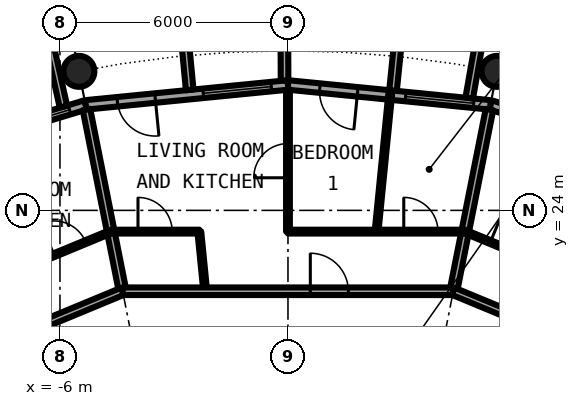
"""IFC4 building model, lengths in metres.
Left out: names, types, materials, properties, quantities, classifications, styles, units other than length and angle.
Written with IfcOpenShell. Run it as: python <this file> out.ifc"""

import sys

from ifc_helpers import new_model, si_unit, direction, frame, frame_2d, origin, origin_2d, place, context, subcontext, project, spatial, rectangle, hollow_circle, extrude, element, fill, save


model = new_model("IFC4")
c1 = context("Model", 3, precision=1e-05, world=origin(), true_north=direction((0.0, 1.0)))
c2 = subcontext(c1, "Body", "Model", "MODEL_VIEW")
j1 = project(units=[si_unit("LENGTHUNIT", "METRE"), si_unit("PLANEANGLEUNIT", "RADIAN")], contexts=[c1])
p1 = place(None, origin())
s1 = spatial("IfcSite", under=j1, at=p1, CompositionType="ELEMENT")
p2 = place(p1, origin())
s2 = spatial("IfcBuilding", under=s1, at=p2, CompositionType="ELEMENT")
p3 = place(p2, frame((0.0, 0.0, 167.7)))
s3 = spatial("IfcBuildingStorey", under=s2, at=p3, CompositionType="ELEMENT", Elevation=167.7)
for number, where, z_axis, x_axis in (
    (1, (5.501, 27.658, 0.0), (0.0, 0.0, 1.0), (1.0, 0.0, 0.0)),
    (2, (-5.501, 27.658, 0.0), (0.0, 0.0, 1.0), (1.0, 0.0, 0.0)),
):
    element("IfcColumn", number, at=place(p3, frame(where, z_axis=z_axis, x_axis=x_axis)), inside=s3, PredefinedType="COLUMN", context=c2, shape_type="SweptSolid", body=[
        extrude(hollow_circle(Radius=0.406, WallThickness=0.04, at=origin_2d()), origin(), (0.0, 0.0, 1.0), 3.05),
    ])
p4 = place(p3, frame((10.447, 25.222, 0.0), z_axis=(0.0, 0.0, 1.0), x_axis=(-0.956965678721, 0.290201119486, 0.0)))
e3 = element("IfcWall", 3, at=p4, inside=s3, PredefinedType="SOLIDWALL", context=c2, shape_type="SweptSolid", body=[
    extrude(rectangle(XDim=5.351, YDim=0.25, at=frame_2d((2.676, 0.0))), origin(), (0.0, 0.0, 1.0), 2.7),
])
p5 = place(p4, frame((0.441, 0.0, 0.3)))
e4 = element("IfcOpeningElement", 4, at=p5, cuts=e3, PredefinedType="OPENING", context=c2, shape_type="SweptSolid", body=[
    extrude(rectangle(XDim=1.8, YDim=2.1, at=frame_2d((0.9, 1.05))), frame((0.0, 0.135, 0.0), z_axis=(0.0, -1.0, 0.0), x_axis=(1.0, 0.0, 0.0)), (0.0, 0.0, 1.0), 0.27),
])
p6 = place(p4, frame((3.51, 0.0, 0.0)))
e5 = element("IfcOpeningElement", 5, at=p6, cuts=e3, PredefinedType="OPENING", context=c2, shape_type="SweptSolid", body=[
    extrude(rectangle(XDim=1.0, YDim=2.2, at=frame_2d((0.5, 1.1))), frame((0.0, 0.135, 0.0), z_axis=(0.0, -1.0, 0.0), x_axis=(1.0, 0.0, 0.0)), (0.0, 0.0, 1.0), 0.27),
])
p7 = place(p3, frame((5.326, 26.775, 0.0), z_axis=(0.0, 0.0, 1.0), x_axis=(-0.995173996315, 0.098126026407, 0.0)))
e6 = element("IfcWall", 6, at=p7, inside=s3, PredefinedType="SOLIDWALL", context=c2, shape_type="SweptSolid", body=[
    extrude(rectangle(XDim=5.352, YDim=0.25, at=frame_2d((2.676, 0.0))), origin(), (0.0, 0.0, 1.0), 2.7),
])
p8 = place(p7, frame((0.441, 0.0, 0.3)))
e7 = element("IfcOpeningElement", 7, at=p8, cuts=e6, PredefinedType="OPENING", context=c2, shape_type="SweptSolid", body=[
    extrude(rectangle(XDim=1.8, YDim=2.1, at=frame_2d((0.9, 1.05))), frame((0.0, 0.135, 0.0), z_axis=(0.0, -1.0, 0.0), x_axis=(1.0, 0.0, 0.0)), (0.0, 0.0, 1.0), 0.27),
])
p9 = place(p7, frame((3.51, 0.0, 0.0)))
e8 = element("IfcOpeningElement", 8, at=p9, cuts=e6, PredefinedType="OPENING", context=c2, shape_type="SweptSolid", body=[
    extrude(rectangle(XDim=1.0, YDim=2.2, at=frame_2d((0.5, 1.1))), frame((0.0, 0.135, 0.0), z_axis=(0.0, -1.0, 0.0), x_axis=(1.0, 0.0, 0.0)), (0.0, 0.0, 1.0), 0.27),
])
p10 = place(p3, frame((4.769, 26.956, -0.03), z_axis=(0.0, 0.0, 1.0), x_axis=(0.174056778901, 0.984735618183, 0.0)))
e9 = element("IfcWall", 9, at=p10, inside=s3, PredefinedType="SOLIDWALL", context=c2, shape_type="SweptSolid", body=[
    extrude(rectangle(XDim=2.925, YDim=0.2, at=frame_2d((1.462, 0.0))), origin(), (0.0, 0.0, 1.0), 2.73),
])
p11 = place(p3, frame((2.764, 27.153, -0.03), z_axis=(0.0, 0.0, 1.0), x_axis=(0.101505487237, 0.994834979311, 0.0)))
e10 = element("IfcWall", 10, at=p11, inside=s3, PredefinedType="SOLIDWALL", context=c2, shape_type="SweptSolid", body=[
    extrude(rectangle(XDim=3.007, YDim=0.2, at=frame_2d((1.503, 0.0))), origin(), (0.0, 0.0, 1.0), 2.73),
])
p12 = place(p3, frame((0.0, 27.3, 0.0), z_axis=(0.0, 0.0, 1.0), x_axis=(-0.995173996315, -0.098126026407, 0.0)))
e11 = element("IfcWall", 11, at=p12, inside=s3, PredefinedType="SOLIDWALL", context=c2, shape_type="SweptSolid", body=[
    extrude(rectangle(XDim=5.352, YDim=0.25, at=frame_2d((2.676, 0.0))), origin(), (0.0, 0.0, 1.0), 2.7),
])
p13 = place(p12, frame((0.441, 0.0, 0.3)))
e12 = element("IfcOpeningElement", 12, at=p13, cuts=e11, PredefinedType="OPENING", context=c2, shape_type="SweptSolid", body=[
    extrude(rectangle(XDim=1.8, YDim=2.1, at=frame_2d((0.9, 1.05))), frame((0.0, 0.135, 0.0), z_axis=(0.0, -1.0, 0.0), x_axis=(1.0, 0.0, 0.0)), (0.0, 0.0, 1.0), 0.27),
])
p14 = place(p12, frame((3.51, 0.0, 0.0)))
e13 = element("IfcOpeningElement", 13, at=p14, cuts=e11, PredefinedType="OPENING", context=c2, shape_type="SweptSolid", body=[
    extrude(rectangle(XDim=1.0, YDim=2.2, at=frame_2d((0.5, 1.1))), frame((0.0, 0.135, 0.0), z_axis=(0.0, -1.0, 0.0), x_axis=(1.0, 0.0, 0.0)), (0.0, 0.0, 1.0), 0.27),
])
p15 = place(p3, frame((-0.09, 27.417, -0.03), z_axis=(0.0, 0.0, 1.0), x_axis=(-0.00347308367, 0.999993968827, 0.0)))
e14 = element("IfcWall", 14, at=p15, inside=s3, PredefinedType="SOLIDWALL", context=c2, shape_type="SweptSolid", body=[
    extrude(rectangle(XDim=2.882, YDim=0.2, at=frame_2d((1.441, 0.0))), origin(), (0.0, 0.0, 1.0), 2.73),
])
p16 = place(p3, frame((-2.586, 27.171, -0.03), z_axis=(0.0, 0.0, 1.0), x_axis=(-0.094548432284, 0.995520262954, 0.0)))
e15 = element("IfcWall", 15, at=p16, inside=s3, PredefinedType="SOLIDWALL", context=c2, shape_type="SweptSolid", body=[
    extrude(rectangle(XDim=3.006, YDim=0.2, at=frame_2d((1.503, 0.0))), origin(), (0.0, 0.0, 1.0), 2.73),
])
p17 = place(p3, frame((-5.326, 26.775, 0.0), z_axis=(0.0, 0.0, 1.0), x_axis=(-0.956965678721, -0.290201119486, 0.0)))
e16 = element("IfcWall", 16, at=p17, inside=s3, PredefinedType="SOLIDWALL", context=c2, shape_type="SweptSolid", body=[
    extrude(rectangle(XDim=5.351, YDim=0.25, at=frame_2d((2.676, 0.0))), origin(), (0.0, 0.0, 1.0), 2.7),
])
p18 = place(p17, frame((0.441, 0.0, 0.3)))
e17 = element("IfcOpeningElement", 17, at=p18, cuts=e16, PredefinedType="OPENING", context=c2, shape_type="SweptSolid", body=[
    extrude(rectangle(XDim=1.8, YDim=2.1, at=frame_2d((0.9, 1.05))), frame((0.0, 0.135, 0.0), z_axis=(0.0, -1.0, 0.0), x_axis=(1.0, 0.0, 0.0)), (0.0, 0.0, 1.0), 0.27),
])
p19 = place(p17, frame((3.51, 0.0, 0.0)))
e18 = element("IfcOpeningElement", 18, at=p19, cuts=e16, PredefinedType="OPENING", context=c2, shape_type="SweptSolid", body=[
    extrude(rectangle(XDim=1.0, YDim=2.2, at=frame_2d((0.5, 1.1))), frame((0.0, 0.135, 0.0), z_axis=(0.0, -1.0, 0.0), x_axis=(1.0, 0.0, 0.0)), (0.0, 0.0, 1.0), 0.27),
])
p20 = place(p3, frame((-5.909, 26.729, -0.03), z_axis=(0.0, 0.0, 1.0), x_axis=(-0.216409053917, 0.976302781612, 0.0)))
e19 = element("IfcWall", 19, at=p20, inside=s3, PredefinedType="SOLIDWALL", context=c2, shape_type="SweptSolid", body=[
    extrude(rectangle(XDim=2.925, YDim=0.2, at=frame_2d((1.463, 0.0))), origin(), (0.0, 0.0, 1.0), 2.73),
])
p21 = place(p3, frame((-5.302, 26.653, 0.0), z_axis=(0.0, 0.0, 1.0), x_axis=(0.195075825861, -0.980788163756, 0.0)))
e20 = element("IfcWall", 20, at=p21, inside=s3, PredefinedType="PARTITIONING", context=c2, shape_type="SweptSolid", body=[
    extrude(rectangle(XDim=4.875, YDim=0.2, at=frame_2d((2.438, 0.0))), origin(), (0.0, 0.0, 1.0), 2.7),
])
p22 = place(p3, frame((-2.333, 23.441, 0.0), z_axis=(0.0, 0.0, 1.0), x_axis=(0.098951748623, -0.995092232632, 0.0)))
e21 = element("IfcWall", 21, at=p22, inside=s3, PredefinedType="PARTITIONING", context=c2, shape_type="SweptSolid", body=[
    extrude(rectangle(XDim=1.577, YDim=0.1, at=frame_2d((0.788, 0.0))), origin(), (0.0, 0.0, 1.0), 2.7),
])
p23 = place(p3, frame((0.0, 23.441, 0.0), z_axis=(0.0, 0.0, 1.0), x_axis=(0.0, 1.0, 0.0)))
e22 = element("IfcWall", 22, at=p23, inside=s3, PredefinedType="PARTITIONING", context=c2, shape_type="SweptSolid", body=[
    extrude(rectangle(XDim=3.734, YDim=0.1, at=frame_2d((1.867, 0.0))), origin(), (0.0, 0.0, 1.0), 2.7),
])
p24 = place(p23, frame((1.417, 0.0, 0.0)))
e23 = element("IfcOpeningElement", 23, at=p24, cuts=e22, PredefinedType="OPENING", context=c2, shape_type="SweptSolid", body=[
    extrude(rectangle(XDim=0.9, YDim=2.3, at=frame_2d((0.45, 1.15))), frame((0.0, 0.06, 0.0), z_axis=(0.0, -1.0, 0.0), x_axis=(1.0, 0.0, 0.0)), (0.0, 0.0, 1.0), 0.12),
])
p25 = place(p3, frame((2.331, 23.441, 0.0), z_axis=(0.0, 0.0, 1.0), x_axis=(0.098902534616, 0.995097125233, 0.0)))
e24 = element("IfcWall", 24, at=p25, inside=s3, PredefinedType="PARTITIONING", context=c2, shape_type="SweptSolid", body=[
    extrude(rectangle(XDim=3.619, YDim=0.1, at=frame_2d((1.81, 0.0))), origin(), (0.0, 0.0, 1.0), 2.7),
])
p26 = place(p3, frame((4.351, 21.872, 0.0), z_axis=(0.0, 0.0, 1.0), x_axis=(0.195075825861, 0.980788163756, 0.0)))
e25 = element("IfcWall", 25, at=p26, inside=s3, PredefinedType="PARTITIONING", context=c2, shape_type="SweptSolid", body=[
    extrude(rectangle(XDim=4.875, YDim=0.2, at=frame_2d((2.438, 0.0))), origin(), (0.0, 0.0, 1.0), 2.7),
])
p27 = place(p3, frame((-12.396, 18.536, 0.0), z_axis=(0.0, 0.0, 1.0), x_axis=(0.923722518166, 0.383062278792, 0.0)))
e26 = element("IfcWall", 26, at=p27, inside=s3, PredefinedType="PARTITIONING", context=c2, shape_type="SweptSolid", body=[
    extrude(rectangle(XDim=8.709, YDim=0.2, at=frame_2d((4.354, 0.0))), origin(), (0.0, 0.0, 1.0), 2.7),
])
p28 = place(p27, frame((2.772, 0.0, 0.0)))
e27 = element("IfcOpeningElement", 27, at=p28, cuts=e26, PredefinedType="OPENING", context=c2, shape_type="SweptSolid", body=[
    extrude(rectangle(XDim=1.0, YDim=2.3, at=frame_2d((0.5, 1.15))), frame((0.0, 0.11, 0.0), z_axis=(0.0, -1.0, 0.0), x_axis=(1.0, 0.0, 0.0)), (0.0, 0.0, 1.0), 0.22),
])
p29 = place(p3, frame((-4.351, 21.872, 0.0), z_axis=(0.0, 0.0, 1.0), x_axis=(1.0, 0.0, 0.0)))
e28 = element("IfcWall", 28, at=p29, inside=s3, PredefinedType="PARTITIONING", context=c2, shape_type="SweptSolid", body=[
    extrude(rectangle(XDim=8.702, YDim=0.2, at=frame_2d((4.351, 0.0))), origin(), (0.0, 0.0, 1.0), 2.7),
])
p30 = place(p29, frame((4.939, 0.0, 0.0)))
e29 = element("IfcOpeningElement", 29, at=p30, cuts=e28, PredefinedType="OPENING", context=c2, shape_type="SweptSolid", body=[
    extrude(rectangle(XDim=1.0, YDim=2.3, at=frame_2d((0.5, 1.15))), frame((0.0, 0.11, 0.0), z_axis=(0.0, -1.0, 0.0), x_axis=(1.0, 0.0, 0.0)), (0.0, 0.0, 1.0), 0.22),
])
p31 = place(p3, frame((4.347, 21.872, 0.0), z_axis=(0.0, 0.0, 1.0), x_axis=(0.923921124994, -0.382583003792, 0.0)))
e30 = element("IfcWall", 30, at=p31, inside=s3, PredefinedType="PARTITIONING", context=c2, shape_type="SweptSolid", body=[
    extrude(rectangle(XDim=8.704, YDim=0.2, at=frame_2d((4.352, 0.0))), origin(), (0.0, 0.0, 1.0), 2.7),
])
p32 = place(p31, frame((2.767, 0.0, 0.0)))
e31 = element("IfcOpeningElement", 31, at=p32, cuts=e30, PredefinedType="OPENING", context=c2, shape_type="SweptSolid", body=[
    extrude(rectangle(XDim=1.0, YDim=2.3, at=frame_2d((0.5, 1.15))), frame((0.0, 0.11, 0.0), z_axis=(0.0, -1.0, 0.0), x_axis=(1.0, 0.0, 0.0)), (0.0, 0.0, 1.0), 0.22),
])
p33 = place(p3, frame((-6.817, 22.548, 0.0), z_axis=(0.0, 0.0, 1.0), x_axis=(0.924061443507, 0.382243964798, 0.0)))
e32 = element("IfcWall", 32, at=p33, inside=s3, PredefinedType="PARTITIONING", context=c2, shape_type="SweptSolid", body=[
    extrude(rectangle(XDim=2.333, YDim=0.1, at=frame_2d((1.167, 0.0))), origin(), (0.0, 0.0, 1.0), 2.7),
])
p34 = place(p33, frame((0.717, 0.0, 0.0)))
e33 = element("IfcOpeningElement", 33, at=p34, cuts=e32, PredefinedType="OPENING", context=c2, shape_type="SweptSolid", body=[
    extrude(rectangle(XDim=0.9, YDim=2.3, at=frame_2d((0.45, 1.15))), frame((0.0, 0.06, 0.0), z_axis=(0.0, -1.0, 0.0), x_axis=(1.0, 0.0, 0.0)), (0.0, 0.0, 1.0), 0.12),
])
p35 = place(p3, frame((-4.663, 23.441, 0.0), z_axis=(0.0, 0.0, 1.0), x_axis=(1.0, 0.0, 0.0)))
e34 = element("IfcWall", 34, at=p35, inside=s3, PredefinedType="PARTITIONING", context=c2, shape_type="SweptSolid", body=[
    extrude(rectangle(XDim=2.332, YDim=0.1, at=frame_2d((1.166, 0.0))), origin(), (0.0, 0.0, 1.0), 2.7),
])
p36 = place(p35, frame((0.716, 0.0, 0.0)))
e35 = element("IfcOpeningElement", 35, at=p36, cuts=e34, PredefinedType="OPENING", context=c2, shape_type="SweptSolid", body=[
    extrude(rectangle(XDim=0.9, YDim=2.3, at=frame_2d((0.45, 1.15))), frame((0.0, 0.06, 0.0), z_axis=(0.0, -1.0, 0.0), x_axis=(1.0, 0.0, 0.0)), (0.0, 0.0, 1.0), 0.12),
])
p37 = place(p3, frame((0.0, 23.441, 0.0), z_axis=(0.0, 0.0, 1.0), x_axis=(1.0, 0.0, 0.0)))
e36 = element("IfcWall", 36, at=p37, inside=s3, PredefinedType="PARTITIONING", context=c2, shape_type="SweptSolid", body=[
    extrude(rectangle(XDim=4.663, YDim=0.1, at=frame_2d((2.332, 0.0))), origin(), (0.0, 0.0, 1.0), 2.7),
])
p38 = place(p37, frame((3.047, 0.0, 0.0)))
e37 = element("IfcOpeningElement", 37, at=p38, cuts=e36, PredefinedType="OPENING", context=c2, shape_type="SweptSolid", body=[
    extrude(rectangle(XDim=0.9, YDim=2.3, at=frame_2d((0.45, 1.15))), frame((0.0, 0.06, 0.0), z_axis=(0.0, -1.0, 0.0), x_axis=(1.0, 0.0, 0.0)), (0.0, 0.0, 1.0), 0.12),
])
p39 = place(p3, frame((4.66, 23.441, 0.0), z_axis=(0.0, 0.0, 1.0), x_axis=(0.923920484476, -0.38258455061, 0.0)))
e38 = element("IfcWall", 38, at=p39, inside=s3, PredefinedType="PARTITIONING", context=c2, shape_type="SweptSolid", body=[
    extrude(rectangle(XDim=4.663, YDim=0.1, at=frame_2d((2.332, 0.0))), origin(), (0.0, 0.0, 1.0), 2.7),
])
p40 = place(p39, frame((0.72, 0.0, 0.0)))
e39 = element("IfcOpeningElement", 39, at=p40, cuts=e38, PredefinedType="OPENING", context=c2, shape_type="SweptSolid", body=[
    extrude(rectangle(XDim=0.9, YDim=2.3, at=frame_2d((0.45, 1.15))), frame((0.0, 0.06, 0.0), z_axis=(0.0, -1.0, 0.0), x_axis=(1.0, 0.0, 0.0)), (0.0, 0.0, 1.0), 0.12),
])
p41 = place(p8, origin())
e40 = element("IfcWindow", 40, at=p41, inside=s3, PartitioningType="SINGLE_PANEL", PredefinedType="WINDOW", context=c2, shape_type="SweptSolid", body=[
    extrude(rectangle(XDim=1.8, YDim=2.1, at=frame_2d((0.9, 1.05))), frame((0.0, 0.03, 0.0), z_axis=(0.0, -1.0, 0.0), x_axis=(1.0, 0.0, 0.0)), (0.0, 0.0, 1.0), 0.06),
])
fill(e7, e40)
p42 = place(p9, origin())
e41 = element("IfcDoor", 41, at=p42, inside=s3, OperationType="SINGLE_SWING_LEFT", PredefinedType="DOOR", context=c2, shape_type="SweptSolid", body=[
    extrude(rectangle(XDim=1.0, YDim=2.2, at=frame_2d((0.5, 1.1))), frame((0.0, 0.025, 0.0), z_axis=(0.0, -1.0, 0.0), x_axis=(1.0, 0.0, 0.0)), (0.0, 0.0, 1.0), 0.05),
])
fill(e8, e41)
p43 = place(p13, origin())
e42 = element("IfcWindow", 42, at=p43, inside=s3, PartitioningType="SINGLE_PANEL", PredefinedType="WINDOW", context=c2, shape_type="SweptSolid", body=[
    extrude(rectangle(XDim=1.8, YDim=2.1, at=frame_2d((0.9, 1.05))), frame((0.0, 0.03, 0.0), z_axis=(0.0, -1.0, 0.0), x_axis=(1.0, 0.0, 0.0)), (0.0, 0.0, 1.0), 0.06),
])
fill(e12, e42)
p44 = place(p14, origin())
e43 = element("IfcDoor", 43, at=p44, inside=s3, OperationType="SINGLE_SWING_LEFT", PredefinedType="DOOR", context=c2, shape_type="SweptSolid", body=[
    extrude(rectangle(XDim=1.0, YDim=2.2, at=frame_2d((0.5, 1.1))), frame((0.0, 0.025, 0.0), z_axis=(0.0, -1.0, 0.0), x_axis=(1.0, 0.0, 0.0)), (0.0, 0.0, 1.0), 0.05),
])
fill(e13, e43)
p45 = place(p18, origin())
e44 = element("IfcWindow", 44, at=p45, inside=s3, PartitioningType="SINGLE_PANEL", PredefinedType="WINDOW", context=c2, shape_type="SweptSolid", body=[
    extrude(rectangle(XDim=1.8, YDim=2.1, at=frame_2d((0.9, 1.05))), frame((0.0, 0.03, 0.0), z_axis=(0.0, -1.0, 0.0), x_axis=(1.0, 0.0, 0.0)), (0.0, 0.0, 1.0), 0.06),
])
fill(e17, e44)
p46 = place(p40, origin())
e45 = element("IfcDoor", 45, at=p46, inside=s3, OperationType="SINGLE_SWING_LEFT", PredefinedType="DOOR", context=c2, shape_type="SweptSolid", body=[
    extrude(rectangle(XDim=0.9, YDim=2.3, at=frame_2d((0.45, 1.15))), frame((0.0, 0.025, 0.0), z_axis=(0.0, -1.0, 0.0), x_axis=(1.0, 0.0, 0.0)), (0.0, 0.0, 1.0), 0.05),
])
fill(e39, e45)
p47 = place(p30, origin())
e46 = element("IfcDoor", 46, at=p47, inside=s3, OperationType="SINGLE_SWING_RIGHT", PredefinedType="DOOR", context=c2, shape_type="SweptSolid", body=[
    extrude(rectangle(XDim=1.0, YDim=2.3, at=frame_2d((0.5, 1.15))), frame((0.0, 0.025, 0.0), z_axis=(0.0, -1.0, 0.0), x_axis=(1.0, 0.0, 0.0)), (0.0, 0.0, 1.0), 0.05),
])
fill(e29, e46)
p48 = place(p36, origin())
e47 = element("IfcDoor", 47, at=p48, inside=s3, OperationType="SINGLE_SWING_RIGHT", PredefinedType="DOOR", context=c2, shape_type="SweptSolid", body=[
    extrude(rectangle(XDim=0.9, YDim=2.3, at=frame_2d((0.45, 1.15))), frame((0.0, 0.025, 0.0), z_axis=(0.0, -1.0, 0.0), x_axis=(1.0, 0.0, 0.0)), (0.0, 0.0, 1.0), 0.05),
])
fill(e35, e47)
p49 = place(p24, origin())
e48 = element("IfcDoor", 48, at=p49, inside=s3, OperationType="SINGLE_SWING_RIGHT", PredefinedType="DOOR", context=c2, shape_type="SweptSolid", body=[
    extrude(rectangle(XDim=0.9, YDim=2.3, at=frame_2d((0.45, 1.15))), frame((0.0, 0.025, 0.0), z_axis=(0.0, -1.0, 0.0), x_axis=(1.0, 0.0, 0.0)), (0.0, 0.0, 1.0), 0.05),
])
fill(e23, e48)
p50 = place(p38, origin())
e49 = element("IfcDoor", 49, at=p50, inside=s3, OperationType="SINGLE_SWING_RIGHT", PredefinedType="DOOR", context=c2, shape_type="SweptSolid", body=[
    extrude(rectangle(XDim=0.9, YDim=2.3, at=frame_2d((0.45, 1.15))), frame((0.0, 0.025, 0.0), z_axis=(0.0, -1.0, 0.0), x_axis=(1.0, 0.0, 0.0)), (0.0, 0.0, 1.0), 0.05),
])
fill(e37, e49)
p51 = place(p34, origin())
e50 = element("IfcDoor", 50, at=p51, inside=s3, OperationType="SINGLE_SWING_RIGHT", PredefinedType="DOOR", context=c2, shape_type="SweptSolid", body=[
    extrude(rectangle(XDim=0.9, YDim=2.3, at=frame_2d((0.45, 1.15))), frame((0.0, 0.025, 0.0), z_axis=(0.0, -1.0, 0.0), x_axis=(1.0, 0.0, 0.0)), (0.0, 0.0, 1.0), 0.05),
])
fill(e33, e50)
save(model, sys.argv[1])
